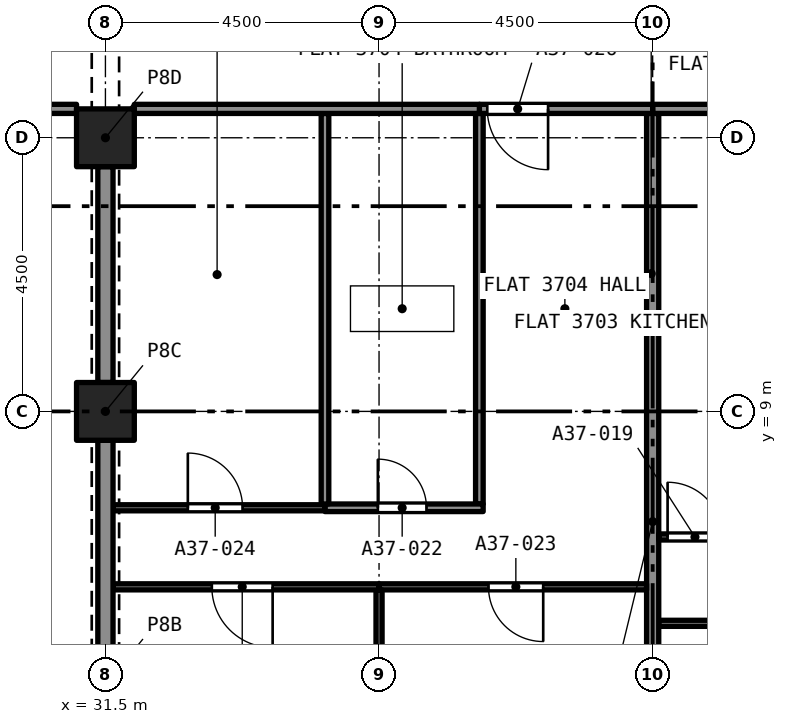
"""IFC4 building model, lengths in metres.
Left out: names, types, materials, properties, quantities, classifications, styles, units other than length and angle.
Written with IfcOpenShell. Run it as: python <this file> out.ifc"""

import sys

from ifc_helpers import new_model, si_unit, direction, frame, frame_2d, origin, origin_2d, place, context, subcontext, project, spatial, rectangle, extrude, element, fill, save


model = new_model("IFC4")
c1 = context("Model", 3, precision=1e-05, world=origin(), true_north=direction((0.0, 1.0)))
c2 = subcontext(c1, "Body", "Model", "MODEL_VIEW")
j1 = project(units=[si_unit("LENGTHUNIT", "METRE"), si_unit("PLANEANGLEUNIT", "RADIAN")], contexts=[c1])
p1 = place(None, origin())
s1 = spatial("IfcSite", under=j1, at=p1, CompositionType="ELEMENT")
p2 = place(p1, origin())
s2 = spatial("IfcBuilding", under=s1, at=p2, CompositionType="ELEMENT")
p3 = place(p2, frame((0.0, 0.0, 133.4)))
s3 = spatial("IfcBuildingStorey", under=s2, at=p3, CompositionType="ELEMENT", Elevation=133.4)
for number, where, z_axis, x_axis in (
    (1, (31.5, 9.0, 0.0), (0.0, 0.0, 1.0), (1.0, 0.0, 0.0)),
    (2, (31.5, 13.5, 0.0), (0.0, 0.0, 1.0), (1.0, 0.0, 0.0)),
):
    element("IfcColumn", number, at=place(p3, frame(where, z_axis=z_axis, x_axis=x_axis)), inside=s3, PredefinedType="COLUMN", context=c2, shape_type="SweptSolid", body=[
        extrude(rectangle(XDim=0.95, YDim=0.95, at=origin_2d()), origin(), (0.0, 0.0, 1.0), 3.2),
    ])
p4 = place(p3, frame((44.95, 5.515, 0.0), z_axis=(0.0, 0.0, 1.0), x_axis=(-1.0, 0.0, 0.0)))
e3 = element("IfcWall", 3, at=p4, inside=s3, PredefinedType="PARTITIONING", context=c2, shape_type="SweptSolid", body=[
    extrude(rectangle(XDim=4.35, YDim=0.1, at=frame_2d((2.175, 0.0))), origin(), (0.0, 0.0, 1.0), 2.9),
])
p5 = place(p4, frame((1.75, 0.0, 0.0)))
e4 = element("IfcOpeningElement", 4, at=p5, cuts=e3, PredefinedType="OPENING", context=c2, shape_type="SweptSolid", body=[
    extrude(rectangle(XDim=0.9, YDim=2.1, at=frame_2d((0.45, 1.05))), frame((0.0, 0.06, 0.0), z_axis=(0.0, -1.0, 0.0), x_axis=(1.0, 0.0, 0.0)), (0.0, 0.0, 1.0), 0.12),
])
p6 = place(p3, frame((40.5, 0.475, 0.0), z_axis=(0.0, 0.0, 1.0), x_axis=(0.0, 1.0, 0.0)))
e5 = element("IfcWall", 5, at=p6, inside=s3, PredefinedType="PARTITIONING", context=c2, shape_type="SweptSolid", body=[
    extrude(rectangle(XDim=13.425, YDim=0.2, at=frame_2d((6.712, 0.0))), origin(), (0.0, 0.0, 1.0), 2.9),
])
p7 = place(p3, frame((40.6, 6.935, 0.0), z_axis=(0.0, 0.0, 1.0), x_axis=(1.0, 0.0, 0.0)))
e6 = element("IfcWall", 6, at=p7, inside=s3, PredefinedType="PARTITIONING", context=c2, shape_type="SweptSolid", body=[
    extrude(rectangle(XDim=1.291, YDim=0.1, at=frame_2d((0.646, 0.0))), origin(), (0.0, 0.0, 1.0), 2.9),
])
p8 = place(p7, frame((0.146, 0.0, 0.0)))
e7 = element("IfcOpeningElement", 7, at=p8, cuts=e6, PredefinedType="OPENING", context=c2, shape_type="SweptSolid", body=[
    extrude(rectangle(XDim=0.9, YDim=2.1, at=frame_2d((0.45, 1.05))), frame((0.0, 0.06, 0.0), z_axis=(0.0, -1.0, 0.0), x_axis=(1.0, 0.0, 0.0)), (0.0, 0.0, 1.0), 0.12),
])
p9 = place(p3, frame((40.5, 13.975, 0.0), z_axis=(0.0, 0.0, 1.0), x_axis=(1.0, 0.0, 0.0)))
e8 = element("IfcWall", 8, at=p9, inside=s3, PredefinedType="PARTITIONING", context=c2, shape_type="SweptSolid", body=[
    extrude(rectangle(XDim=2.55, YDim=0.15, at=frame_2d((1.275, 0.0))), origin(), (0.0, 0.0, 1.0), 2.9),
])
p10 = place(p3, frame((37.65, 7.478, 0.0), z_axis=(0.0, 0.0, 1.0), x_axis=(0.0, 1.0, 0.0)))
e9 = element("IfcWall", 9, at=p10, inside=s3, PredefinedType="PARTITIONING", context=c2, shape_type="SweptSolid", body=[
    extrude(rectangle(XDim=6.422, YDim=0.125, at=frame_2d((3.211, 0.0))), origin(), (0.0, 0.0, 1.0), 2.9),
])
p11 = place(p3, frame((35.111, 7.415, 0.0), z_axis=(0.0, 0.0, 1.0), x_axis=(1.0, 0.0, 0.0)))
e10 = element("IfcWall", 10, at=p11, inside=s3, PredefinedType="PARTITIONING", context=c2, shape_type="SweptSolid", body=[
    extrude(rectangle(XDim=2.602, YDim=0.125, at=frame_2d((1.301, 0.0))), origin(), (0.0, 0.0, 1.0), 2.9),
])
p12 = place(p11, frame((0.87, 0.0, 0.0)))
e11 = element("IfcOpeningElement", 11, at=p12, cuts=e10, PredefinedType="OPENING", context=c2, shape_type="SweptSolid", body=[
    extrude(rectangle(XDim=0.8, YDim=2.1, at=frame_2d((0.4, 1.05))), frame((0.0, 0.073, 0.0), z_axis=(0.0, -1.0, 0.0), x_axis=(1.0, 0.0, 0.0)), (0.0, 0.0, 1.0), 0.145),
])
p13 = place(p3, frame((35.111, 7.478, 0.0), z_axis=(0.0, 0.0, 1.0), x_axis=(0.0, 1.0, 0.0)))
e12 = element("IfcWall", 12, at=p13, inside=s3, PredefinedType="PARTITIONING", context=c2, shape_type="SweptSolid", body=[
    extrude(rectangle(XDim=6.422, YDim=0.125, at=frame_2d((3.211, 0.0))), origin(), (0.0, 0.0, 1.0), 2.9),
])
p14 = place(p3, frame((40.4, 6.115, 0.0), z_axis=(0.0, 0.0, 1.0), x_axis=(-1.0, 0.0, 0.0)))
e13 = element("IfcWall", 13, at=p14, inside=s3, PredefinedType="PARTITIONING", context=c2, shape_type="SweptSolid", body=[
    extrude(rectangle(XDim=4.4, YDim=0.1, at=frame_2d((2.2, 0.0))), origin(), (0.0, 0.0, 1.0), 2.9),
])
p15 = place(p14, frame((1.7, 0.0, 0.0)))
e14 = element("IfcOpeningElement", 14, at=p15, cuts=e13, PredefinedType="OPENING", context=c2, shape_type="SweptSolid", body=[
    extrude(rectangle(XDim=0.9, YDim=2.1, at=frame_2d((0.45, 1.05))), frame((0.0, 0.06, 0.0), z_axis=(0.0, -1.0, 0.0), x_axis=(1.0, 0.0, 0.0)), (0.0, 0.0, 1.0), 0.12),
])
p16 = place(p3, frame((36.0, 0.475, 0.0), z_axis=(0.0, 0.0, 1.0), x_axis=(0.0, 1.0, 0.0)))
e15 = element("IfcWall", 15, at=p16, inside=s3, PredefinedType="PARTITIONING", context=c2, shape_type="SweptSolid", body=[
    extrude(rectangle(XDim=5.59, YDim=0.1, at=frame_2d((2.795, 0.0))), origin(), (0.0, 0.0, 1.0), 2.9),
])
p17 = place(p3, frame((31.625, 7.415, 0.0), z_axis=(0.0, 0.0, 1.0), x_axis=(1.0, 0.0, 0.0)))
e16 = element("IfcWall", 16, at=p17, inside=s3, PredefinedType="PARTITIONING", context=c2, shape_type="SweptSolid", body=[
    extrude(rectangle(XDim=3.486, YDim=0.1, at=frame_2d((1.743, 0.0))), origin(), (0.0, 0.0, 1.0), 2.9),
])
p18 = place(p17, frame((1.23, 0.0, 0.0)))
e17 = element("IfcOpeningElement", 17, at=p18, cuts=e16, PredefinedType="OPENING", context=c2, shape_type="SweptSolid", body=[
    extrude(rectangle(XDim=0.9, YDim=2.1, at=frame_2d((0.45, 1.05))), frame((0.0, 0.06, 0.0), z_axis=(0.0, -1.0, 0.0), x_axis=(1.0, 0.0, 0.0)), (0.0, 0.0, 1.0), 0.12),
])
p19 = place(p3, frame((36.0, 6.115, 0.0), z_axis=(0.0, 0.0, 1.0), x_axis=(-1.0, 0.0, 0.0)))
e18 = element("IfcWall", 18, at=p19, inside=s3, PredefinedType="PARTITIONING", context=c2, shape_type="SweptSolid", body=[
    extrude(rectangle(XDim=4.375, YDim=0.1, at=frame_2d((2.188, 0.0))), origin(), (0.0, 0.0, 1.0), 2.9),
])
p20 = place(p19, frame((1.75, 0.0, 0.0)))
e19 = element("IfcOpeningElement", 19, at=p20, cuts=e18, PredefinedType="OPENING", context=c2, shape_type="SweptSolid", body=[
    extrude(rectangle(XDim=1.0, YDim=2.1, at=frame_2d((0.5, 1.05))), frame((0.0, 0.06, 0.0), z_axis=(0.0, -1.0, 0.0), x_axis=(1.0, 0.0, 0.0)), (0.0, 0.0, 1.0), 0.12),
])
p21 = place(p3, frame((40.5, 13.975, 0.0), z_axis=(0.0, 0.0, 1.0), x_axis=(-1.0, 0.0, 0.0)))
e20 = element("IfcWall", 20, at=p21, inside=s3, PredefinedType="PARTITIONING", context=c2, shape_type="SweptSolid", body=[
    extrude(rectangle(XDim=2.85, YDim=0.15, at=frame_2d((1.425, 0.0))), origin(), (0.0, 0.0, 1.0), 2.9),
])
p22 = place(p21, frame((1.72, 0.0, 0.0)))
e21 = element("IfcOpeningElement", 21, at=p22, cuts=e20, PredefinedType="OPENING", context=c2, shape_type="SweptSolid", body=[
    extrude(rectangle(XDim=1.0, YDim=2.1, at=frame_2d((0.5, 1.05))), frame((0.0, 0.085, 0.0), z_axis=(0.0, -1.0, 0.0), x_axis=(1.0, 0.0, 0.0)), (0.0, 0.0, 1.0), 0.17),
])
p23 = place(p3, frame((31.5, 9.475, 0.0), z_axis=(0.0, 0.0, 1.0), x_axis=(0.0, 1.0, 0.0)))
e22 = element("IfcWall", 22, at=p23, inside=s3, PredefinedType="PARTITIONING", context=c2, shape_type="SweptSolid", body=[
    extrude(rectangle(XDim=3.55, YDim=0.25, at=frame_2d((1.775, 0.0))), origin(), (0.0, 0.0, 1.0), 2.38),
])
p24 = place(p3, frame((31.975, 13.975, 0.0), z_axis=(0.0, 0.0, 1.0), x_axis=(1.0, 0.0, 0.0)))
e23 = element("IfcWall", 23, at=p24, inside=s3, PredefinedType="PARTITIONING", context=c2, shape_type="SweptSolid", body=[
    extrude(rectangle(XDim=5.675, YDim=0.15, at=frame_2d((2.837, 0.0))), origin(), (0.0, 0.0, 1.0), 2.9),
])
p25 = place(p3, frame((31.5, 4.975, 0.0), z_axis=(0.0, 0.0, 1.0), x_axis=(0.0, 1.0, 0.0)))
e24 = element("IfcWall", 24, at=p25, inside=s3, PredefinedType="PARTITIONING", context=c2, shape_type="SweptSolid", body=[
    extrude(rectangle(XDim=3.55, YDim=0.25, at=frame_2d((1.775, 0.0))), origin(), (0.0, 0.0, 1.0), 2.38),
])
p26 = place(p3, frame((31.025, 13.975, 0.0), z_axis=(0.0, 0.0, 1.0), x_axis=(-1.0, 0.0, 0.0)))
e25 = element("IfcWall", 25, at=p26, inside=s3, PredefinedType="PARTITIONING", context=c2, shape_type="SweptSolid", body=[
    extrude(rectangle(XDim=8.525, YDim=0.15, at=frame_2d((4.262, 0.0))), origin(), (0.0, 0.0, 1.0), 2.75),
])
p27 = place(p26, frame((3.525, 0.0, 0.0)))
e26 = element("IfcOpeningElement", 26, at=p27, cuts=e25, PredefinedType="OPENING", context=c2, shape_type="SweptSolid", body=[
    extrude(rectangle(XDim=1.0, YDim=2.1, at=frame_2d((0.5, 1.05))), frame((0.0, 0.085, 0.0), z_axis=(0.0, -1.0, 0.0), x_axis=(1.0, 0.0, 0.0)), (0.0, 0.0, 1.0), 0.17),
])
p28 = place(p8, origin())
e27 = element("IfcDoor", 27, at=p28, inside=s3, OperationType="SINGLE_SWING_LEFT", PredefinedType="DOOR", context=c2, shape_type="SweptSolid", body=[
    extrude(rectangle(XDim=0.9, YDim=2.1, at=frame_2d((0.45, 1.05))), frame((0.0, 0.025, 0.0), z_axis=(0.0, -1.0, 0.0), x_axis=(1.0, 0.0, 0.0)), (0.0, 0.0, 1.0), 0.05),
])
fill(e7, e27)
p29 = place(p12, origin())
e28 = element("IfcDoor", 28, at=p29, inside=s3, OperationType="SINGLE_SWING_LEFT", PredefinedType="DOOR", context=c2, shape_type="SweptSolid", body=[
    extrude(rectangle(XDim=0.8, YDim=2.1, at=frame_2d((0.4, 1.05))), frame((0.0, 0.025, 0.0), z_axis=(0.0, -1.0, 0.0), x_axis=(1.0, 0.0, 0.0)), (0.0, 0.0, 1.0), 0.05),
])
fill(e11, e28)
p30 = place(p15, origin())
e29 = element("IfcDoor", 29, at=p30, inside=s3, OperationType="SINGLE_SWING_LEFT", PredefinedType="DOOR", context=c2, shape_type="SweptSolid", body=[
    extrude(rectangle(XDim=0.9, YDim=2.1, at=frame_2d((0.45, 1.05))), frame((0.0, 0.025, 0.0), z_axis=(0.0, -1.0, 0.0), x_axis=(1.0, 0.0, 0.0)), (0.0, 0.0, 1.0), 0.05),
])
fill(e14, e29)
p31 = place(p18, origin())
e30 = element("IfcDoor", 30, at=p31, inside=s3, OperationType="SINGLE_SWING_LEFT", PredefinedType="DOOR", context=c2, shape_type="SweptSolid", body=[
    extrude(rectangle(XDim=0.9, YDim=2.1, at=frame_2d((0.45, 1.05))), frame((0.0, 0.025, 0.0), z_axis=(0.0, -1.0, 0.0), x_axis=(1.0, 0.0, 0.0)), (0.0, 0.0, 1.0), 0.05),
])
fill(e17, e30)
p32 = place(p20, origin())
e31 = element("IfcDoor", 31, at=p32, inside=s3, OperationType="SINGLE_SWING_RIGHT", PredefinedType="DOOR", context=c2, shape_type="SweptSolid", body=[
    extrude(rectangle(XDim=1.0, YDim=2.1, at=frame_2d((0.5, 1.05))), frame((0.0, 0.025, 0.0), z_axis=(0.0, -1.0, 0.0), x_axis=(1.0, 0.0, 0.0)), (0.0, 0.0, 1.0), 0.05),
])
fill(e19, e31)
p33 = place(p22, origin())
e32 = element("IfcDoor", 32, at=p33, inside=s3, OperationType="SINGLE_SWING_RIGHT", PredefinedType="DOOR", context=c2, shape_type="SweptSolid", body=[
    extrude(rectangle(XDim=1.0, YDim=2.1, at=frame_2d((0.5, 1.05))), frame((0.0, 0.025, 0.0), z_axis=(0.0, -1.0, 0.0), x_axis=(1.0, 0.0, 0.0)), (0.0, 0.0, 1.0), 0.05),
])
fill(e21, e32)
save(model, sys.argv[1])
